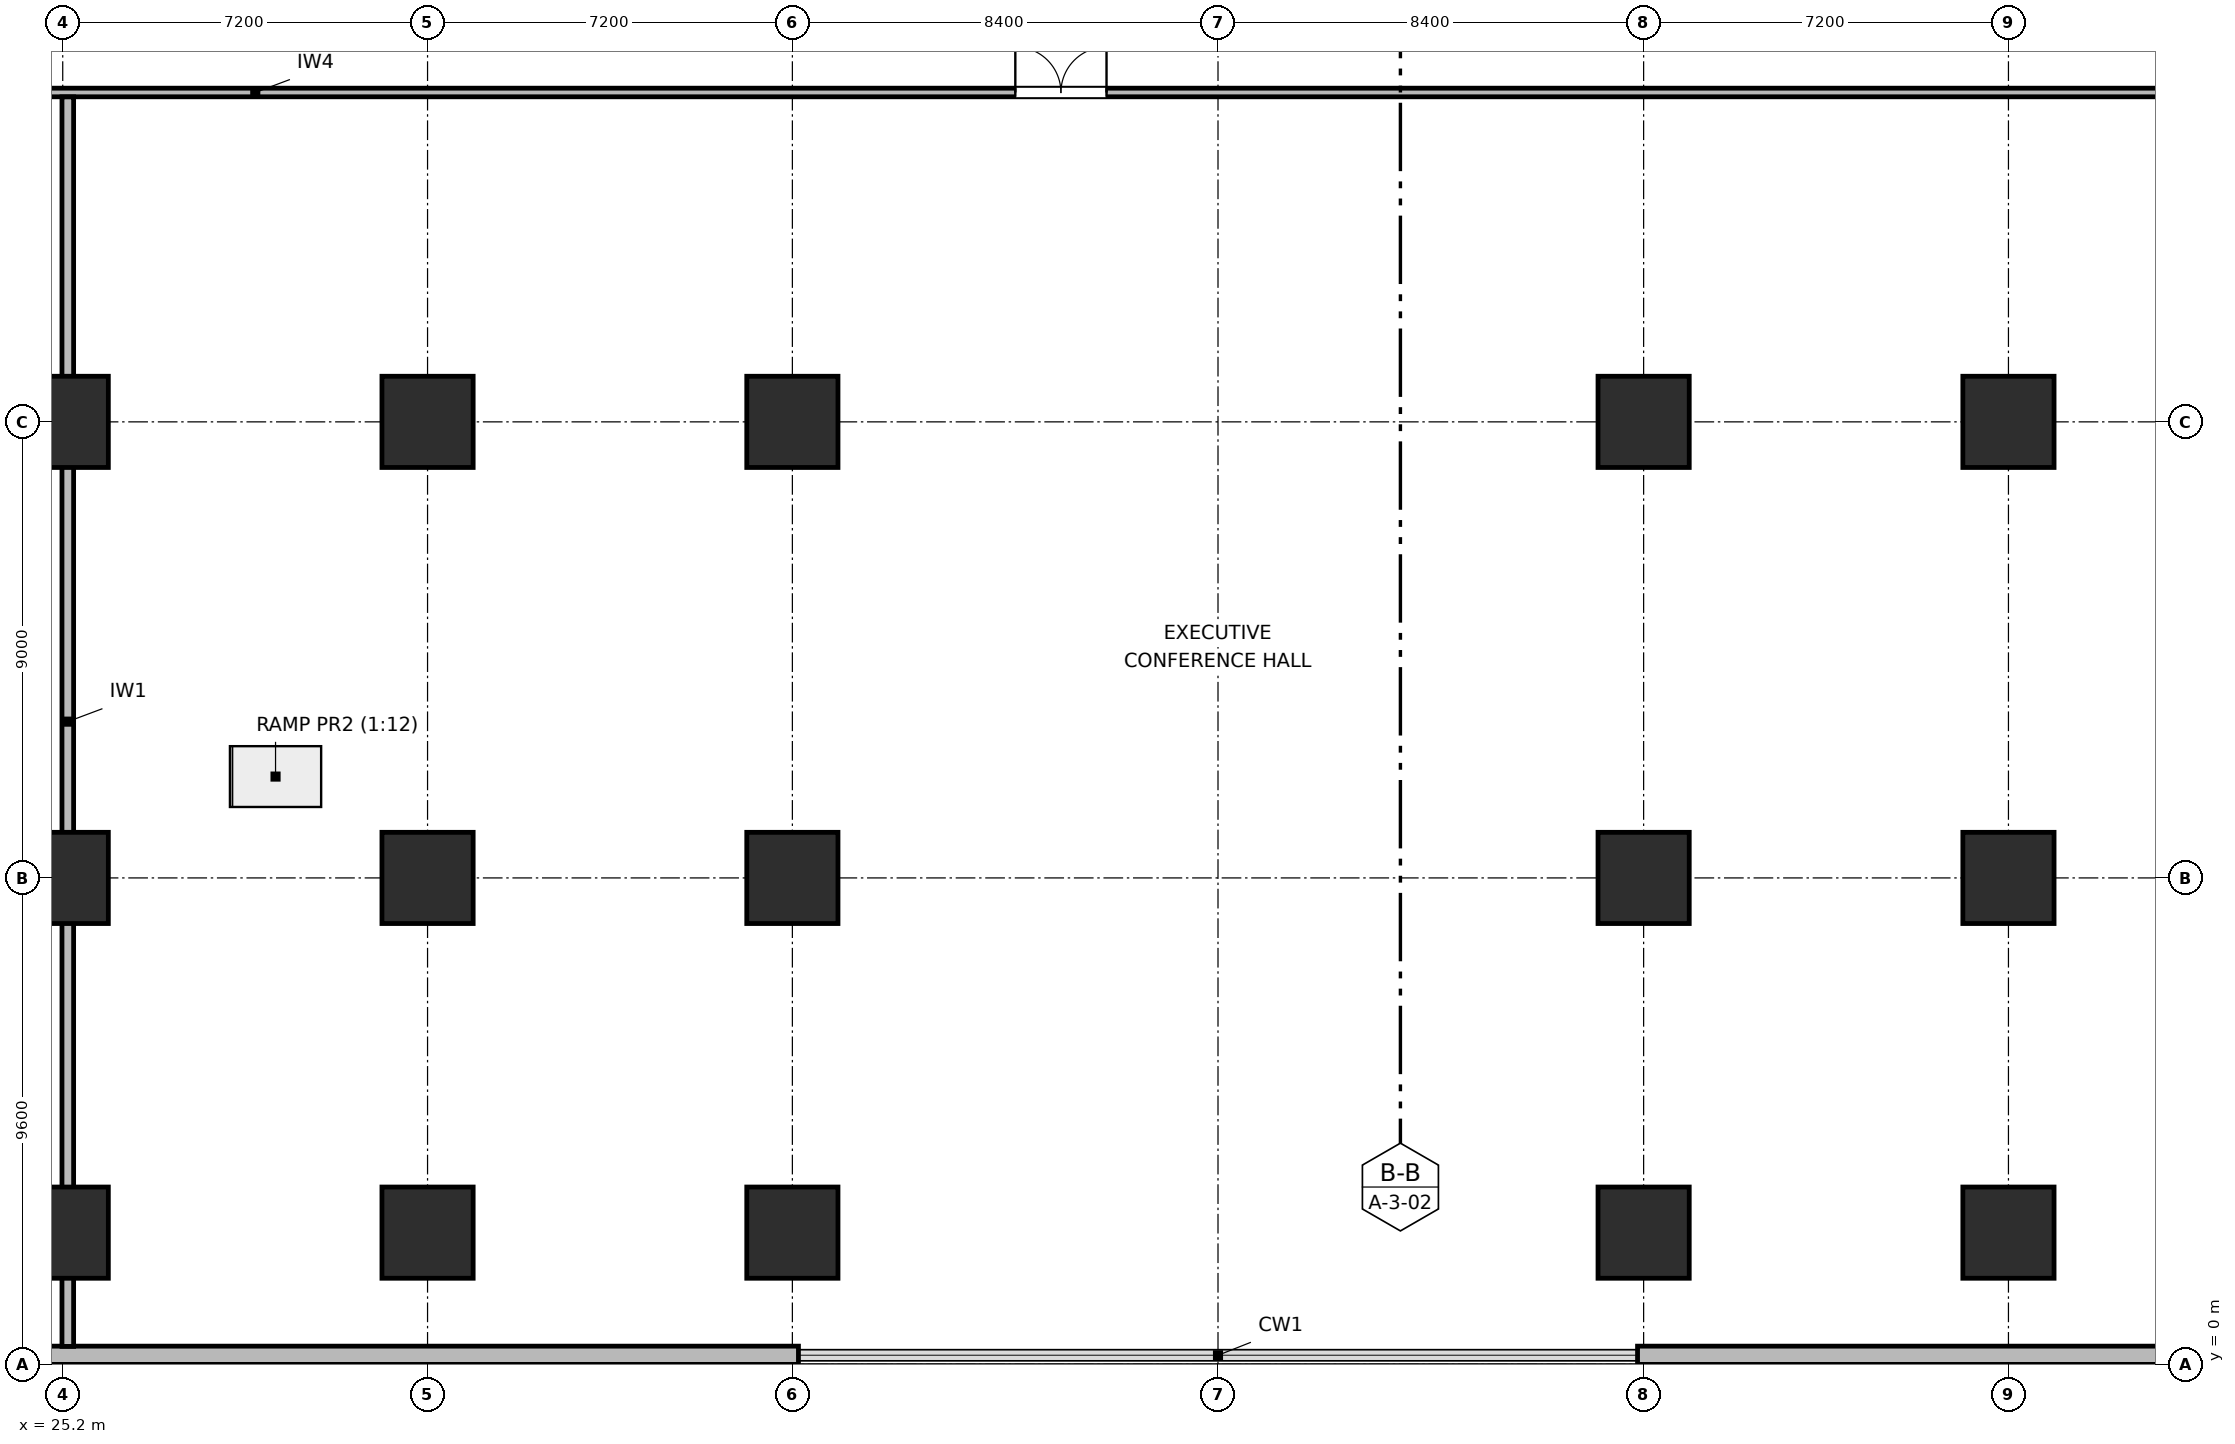
"""IFC4 building model, lengths in metres.
Left out: names, types, materials, properties, quantities, classifications, styles, units other than length and angle.
Written with IfcOpenShell. Run it as: python <this file> out.ifc"""

import sys

from ifc_helpers import new_model, si_unit, direction, frame, frame_2d, origin, origin_2d, place, context, subcontext, project, spatial, rectangle, extrude, element, fill, save


model = new_model("IFC4")
c1 = context("Model", 3, precision=1e-05, world=origin(), true_north=direction((0.0, 1.0)))
c2 = subcontext(c1, "Body", "Model", "MODEL_VIEW")
j1 = project(units=[si_unit("LENGTHUNIT", "METRE"), si_unit("PLANEANGLEUNIT", "RADIAN")], contexts=[c1])
p1 = place(None, origin())
s1 = spatial("IfcSite", under=j1, at=p1, CompositionType="ELEMENT")
p2 = place(p1, origin())
s2 = spatial("IfcBuilding", under=s1, at=p2, CompositionType="ELEMENT")
p3 = place(p2, frame((0.0, 0.0, 4.5)))
s3 = spatial("IfcBuildingStorey", under=s2, at=p3, CompositionType="ELEMENT", Elevation=4.5)
for number, where, z_axis, x_axis in (
    (1, (25.2, 2.6, 0.0), (0.0, 0.0, 1.0), (1.0, 0.0, 0.0)),
    (2, (25.2, 9.6, 0.0), (0.0, 0.0, 1.0), (1.0, 0.0, 0.0)),
    (3, (25.2, 18.6, 0.0), (0.0, 0.0, 1.0), (1.0, 0.0, 0.0)),
    (4, (32.4, 2.6, 0.0), (0.0, 0.0, 1.0), (1.0, 0.0, 0.0)),
    (5, (32.4, 9.6, 0.0), (0.0, 0.0, 1.0), (1.0, 0.0, 0.0)),
    (6, (32.4, 18.6, 0.0), (0.0, 0.0, 1.0), (1.0, 0.0, 0.0)),
    (7, (39.6, 2.6, 0.0), (0.0, 0.0, 1.0), (1.0, 0.0, 0.0)),
    (8, (39.6, 9.6, 0.0), (0.0, 0.0, 1.0), (1.0, 0.0, 0.0)),
    (9, (39.6, 18.6, 0.0), (0.0, 0.0, 1.0), (1.0, 0.0, 0.0)),
    (10, (56.4, 2.6, 0.0), (0.0, 0.0, 1.0), (1.0, 0.0, 0.0)),
    (11, (56.4, 9.6, 0.0), (0.0, 0.0, 1.0), (1.0, 0.0, 0.0)),
    (12, (56.4, 18.6, 0.0), (0.0, 0.0, 1.0), (1.0, 0.0, 0.0)),
    (13, (63.6, 2.6, 0.0), (0.0, 0.0, 1.0), (1.0, 0.0, 0.0)),
    (14, (63.6, 9.6, 0.0), (0.0, 0.0, 1.0), (1.0, 0.0, 0.0)),
    (15, (63.6, 18.6, 0.0), (0.0, 0.0, 1.0), (1.0, 0.0, 0.0)),
):
    element("IfcColumn", number, at=place(p3, frame(where, z_axis=z_axis, x_axis=x_axis)), inside=s3, PredefinedType="COLUMN", context=c2, shape_type="SweptSolid", body=[
        extrude(rectangle(XDim=1.8, YDim=1.8, at=origin_2d()), origin(), (0.0, 0.0, 1.0), 4.2),
    ])
for number, where, z_axis, x_axis in (
    (16, (96.0, 0.18, 0.0), (0.0, 0.0, 1.0), (-1.0, 0.0, 0.0)),
    (17, (39.72, 0.18, 0.0), (0.0, 0.0, 1.0), (-1.0, 0.0, 0.0)),
):
    element("IfcWall", number, at=place(p3, frame(where, z_axis=z_axis, x_axis=x_axis)), inside=s3, PredefinedType="SOLIDWALL", context=c2, shape_type="SweptSolid", body=[
        extrude(rectangle(XDim=39.72, YDim=0.36, at=frame_2d((19.86, 0.0))), origin(), (0.0, 0.0, 1.0), 3.88),
    ])
p4 = place(p3, frame((10.0, 25.1, 0.0), z_axis=(0.0, 0.0, 1.0), x_axis=(1.0, 0.0, 0.0)))
e18 = element("IfcWall", 18, at=p4, inside=s3, PredefinedType="PARTITIONING", context=c2, shape_type="SweptSolid", body=[
    extrude(rectangle(XDim=76.0, YDim=0.17, at=frame_2d((38.0, 0.0))), origin(), (0.0, 0.0, 1.0), 3.88),
])
p5 = place(p4, frame((2.2, 0.0, 0.0)))
e19 = element("IfcOpeningElement", 19, at=p5, cuts=e18, PredefinedType="OPENING", context=c2, shape_type="SweptSolid", body=[
    extrude(rectangle(XDim=1.8, YDim=2.06, at=frame_2d((0.9, 1.03))), frame((0.0, 0.095, 0.0), z_axis=(0.0, -1.0, 0.0), x_axis=(1.0, 0.0, 0.0)), (0.0, 0.0, 1.0), 0.19),
])
p6 = place(p4, frame((34.0, 0.0, 0.0)))
e20 = element("IfcOpeningElement", 20, at=p6, cuts=e18, PredefinedType="OPENING", context=c2, shape_type="SweptSolid", body=[
    extrude(rectangle(XDim=1.8, YDim=2.06, at=frame_2d((0.9, 1.03))), frame((0.0, 0.095, 0.0), z_axis=(0.0, -1.0, 0.0), x_axis=(1.0, 0.0, 0.0)), (0.0, 0.0, 1.0), 0.19),
])
p7 = place(p4, frame((64.0, 0.0, 0.0)))
e21 = element("IfcOpeningElement", 21, at=p7, cuts=e18, PredefinedType="OPENING", context=c2, shape_type="SweptSolid", body=[
    extrude(rectangle(XDim=1.1, YDim=2.05, at=frame_2d((0.55, 1.025))), frame((0.0, 0.095, 0.0), z_axis=(0.0, -1.0, 0.0), x_axis=(1.0, 0.0, 0.0)), (0.0, 0.0, 1.0), 0.19),
])
p8 = place(p3, frame((25.3, 0.355, 0.0), z_axis=(0.0, 0.0, 1.0), x_axis=(0.0, 1.0, 0.0)))
e22 = element("IfcWall", 22, at=p8, inside=s3, PredefinedType="PARTITIONING", context=c2, shape_type="SweptSolid", body=[
    extrude(rectangle(XDim=24.658, YDim=0.23, at=frame_2d((12.329, 0.0))), origin(), (0.0, 0.0, 1.0), 3.092),
])
p9 = place(p6, origin())
e23 = element("IfcDoor", 23, at=p9, inside=s3, OperationType="DOUBLE_DOOR_SINGLE_SWING", PredefinedType="DOOR", context=c2, shape_type="SweptSolid", body=[
    extrude(rectangle(XDim=1.8, YDim=2.06, at=frame_2d((0.9, 1.03))), frame((0.0, 0.025, 0.0), z_axis=(0.0, -1.0, 0.0), x_axis=(1.0, 0.0, 0.0)), (0.0, 0.0, 1.0), 0.05),
])
fill(e20, e23)
save(model, sys.argv[1])
